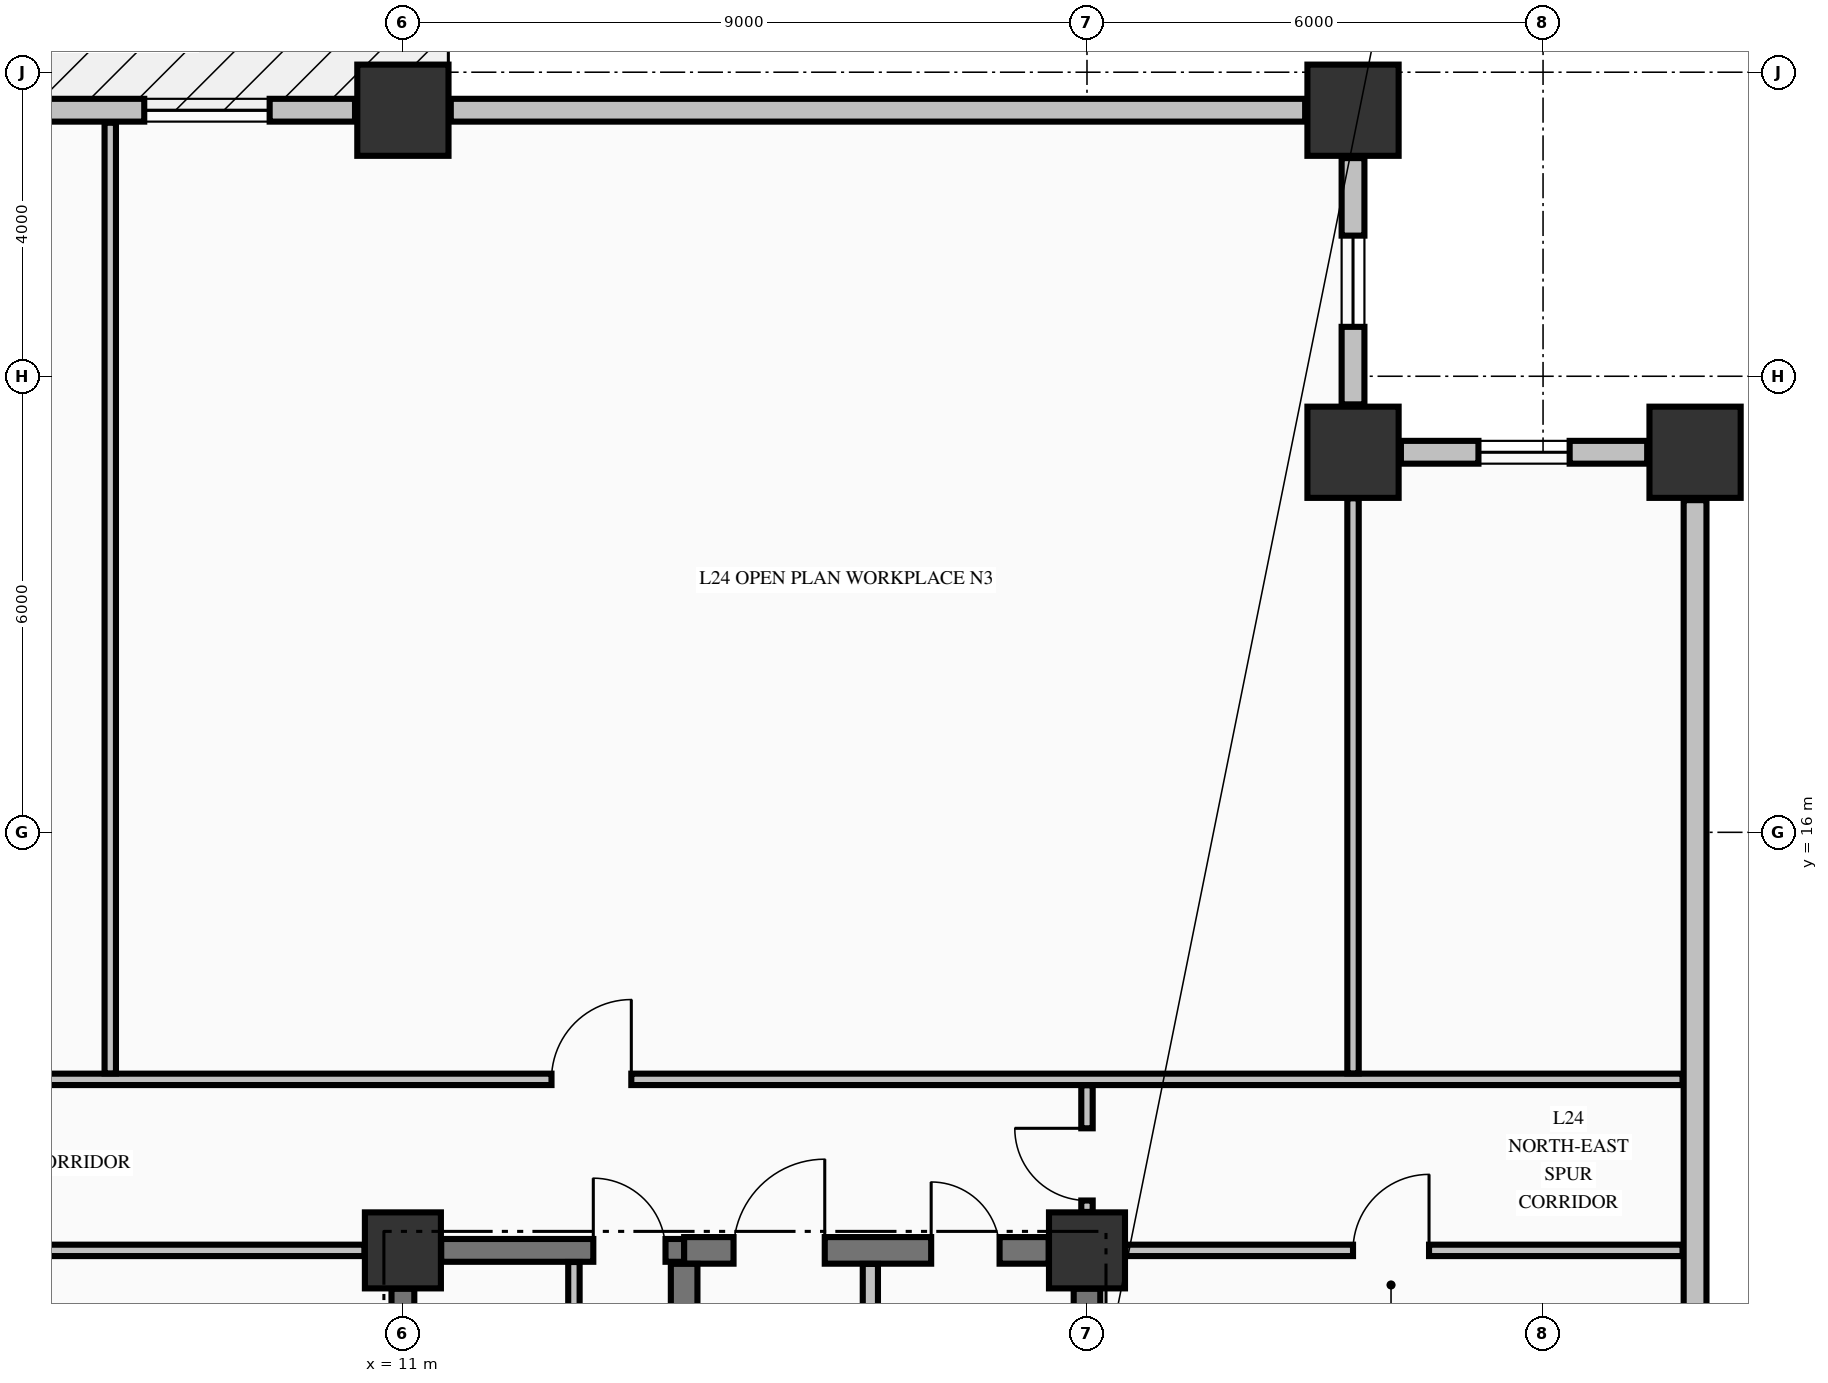
"""IFC4 building model, lengths in metres.
Left out: names, types, materials, properties, quantities, classifications, styles, units other than length and angle.
Written with IfcOpenShell. Run it as: python <this file> out.ifc"""

import sys

from ifc_helpers import new_model, si_unit, direction, frame, frame_2d, origin, origin_2d, place, context, subcontext, project, spatial, rectangle, extrude, element, fill, save


model = new_model("IFC4")
c1 = context("Model", 3, precision=1e-05, world=origin(), true_north=direction((0.0, 1.0)))
c2 = subcontext(c1, "Body", "Model", "MODEL_VIEW")
j1 = project(units=[si_unit("LENGTHUNIT", "METRE"), si_unit("PLANEANGLEUNIT", "RADIAN")], contexts=[c1])
p1 = place(None, origin())
s1 = spatial("IfcSite", under=j1, at=p1, CompositionType="ELEMENT")
p2 = place(p1, origin())
s2 = spatial("IfcBuilding", under=s1, at=p2, CompositionType="ELEMENT")
p3 = place(p2, frame((0.0, 0.0, 98.5)))
s3 = spatial("IfcBuildingStorey", under=s2, at=p3, CompositionType="ELEMENT", Elevation=98.5)
for number, where, z_axis, x_axis in (
    (1, (11.0, 25.5, -0.275), (0.0, 0.0, 1.0), (1.0, 0.0, 0.0)),
    (2, (23.5, 25.5, -0.275), (0.0, 0.0, 1.0), (1.0, 0.0, 0.0)),
    (3, (28.0, 21.0, -0.275), (0.0, 0.0, 1.0), (1.0, 0.0, 0.0)),
    (4, (23.5, 21.0, -0.275), (0.0, 0.0, 1.0), (1.0, 0.0, 0.0)),
):
    element("IfcColumn", number, at=place(p3, frame(where, z_axis=z_axis, x_axis=x_axis)), inside=s3, PredefinedType="COLUMN", context=c2, shape_type="SweptSolid", body=[
        extrude(rectangle(XDim=1.2, YDim=1.2, at=origin_2d()), origin(), (0.0, 0.0, 1.0), 3.595),
    ])
for number, where, z_axis, x_axis in (
    (5, (11.0, 10.5, -0.275), (0.0, 0.0, 1.0), (1.0, 0.0, 0.0)),
    (6, (20.0, 10.5, -0.275), (0.0, 0.0, 1.0), (1.0, 0.0, 0.0)),
):
    element("IfcColumn", number, at=place(p3, frame(where, z_axis=z_axis, x_axis=x_axis)), inside=s3, PredefinedType="COLUMN", context=c2, shape_type="SweptSolid", body=[
        extrude(rectangle(XDim=1.0, YDim=1.0, at=origin_2d()), origin(), (0.0, 0.0, 1.0), 3.595),
    ])
p4 = place(p3, frame((27.37, 21.0, 0.0), z_axis=(0.0, 0.0, 1.0), x_axis=(-1.0, 0.0, 0.0)))
e7 = element("IfcWall", 7, at=p4, inside=s3, PredefinedType="STANDARD", context=c2, shape_type="SweptSolid", body=[
    extrude(rectangle(XDim=3.24, YDim=0.3, at=frame_2d((1.62, 0.0))), origin(), (0.0, 0.0, 1.0), 2.712),
])
p5 = place(p4, frame((1.02, 0.0, 0.82)))
e8 = element("IfcOpeningElement", 8, at=p5, cuts=e7, PredefinedType="OPENING", context=c2, shape_type="SweptSolid", body=[
    extrude(rectangle(XDim=1.2, YDim=1.65, at=frame_2d((0.6, 0.825))), frame((0.0, 0.16, 0.0), z_axis=(0.0, -1.0, 0.0), x_axis=(1.0, 0.0, 0.0)), (0.0, 0.0, 1.0), 0.32),
])
p6 = place(p3, frame((23.5, 21.63, 0.0), z_axis=(0.0, 0.0, 1.0), x_axis=(0.0, 1.0, 0.0)))
e9 = element("IfcWall", 9, at=p6, inside=s3, PredefinedType="STANDARD", context=c2, shape_type="SweptSolid", body=[
    extrude(rectangle(XDim=3.24, YDim=0.3, at=frame_2d((1.62, 0.0))), origin(), (0.0, 0.0, 1.0), 2.712),
])
p7 = place(p6, frame((1.02, 0.0, 0.82)))
e10 = element("IfcOpeningElement", 10, at=p7, cuts=e9, PredefinedType="OPENING", context=c2, shape_type="SweptSolid", body=[
    extrude(rectangle(XDim=1.2, YDim=1.65, at=frame_2d((0.6, 0.825))), frame((0.0, 0.16, 0.0), z_axis=(0.0, -1.0, 0.0), x_axis=(1.0, 0.0, 0.0)), (0.0, 0.0, 1.0), 0.32),
])
p8 = place(p3, frame((10.37, 25.5, 0.0), z_axis=(0.0, 0.0, 1.0), x_axis=(-1.0, 0.0, 0.0)))
e11 = element("IfcWall", 11, at=p8, inside=s3, PredefinedType="STANDARD", context=c2, shape_type="SweptSolid", body=[
    extrude(rectangle(XDim=9.74, YDim=0.3, at=frame_2d((4.87, 0.0))), origin(), (0.0, 0.0, 1.0), 2.712),
])
p9 = place(p8, frame((1.123, 0.0, 0.8)))
e12 = element("IfcOpeningElement", 12, at=p9, cuts=e11, PredefinedType="OPENING", context=c2, shape_type="SweptSolid", body=[
    extrude(rectangle(XDim=1.65, YDim=1.7, at=frame_2d((0.825, 0.85))), frame((0.0, 0.16, 0.0), z_axis=(0.0, -1.0, 0.0), x_axis=(1.0, 0.0, 0.0)), (0.0, 0.0, 1.0), 0.32),
])
p10 = place(p8, frame((5.019, 0.0, 0.8)))
e13 = element("IfcOpeningElement", 13, at=p10, cuts=e11, PredefinedType="OPENING", context=c2, shape_type="SweptSolid", body=[
    extrude(rectangle(XDim=1.65, YDim=1.7, at=frame_2d((0.825, 0.85))), frame((0.0, 0.16, 0.0), z_axis=(0.0, -1.0, 0.0), x_axis=(1.0, 0.0, 0.0)), (0.0, 0.0, 1.0), 0.32),
])
p11 = place(p8, frame((6.967, 0.0, 0.8)))
e14 = element("IfcOpeningElement", 14, at=p11, cuts=e11, PredefinedType="OPENING", context=c2, shape_type="SweptSolid", body=[
    extrude(rectangle(XDim=1.65, YDim=1.7, at=frame_2d((0.825, 0.85))), frame((0.0, 0.16, 0.0), z_axis=(0.0, -1.0, 0.0), x_axis=(1.0, 0.0, 0.0)), (0.0, 0.0, 1.0), 0.32),
])
p12 = place(p3, frame((22.87, 25.5, 0.0), z_axis=(0.0, 0.0, 1.0), x_axis=(-1.0, 0.0, 0.0)))
e15 = element("IfcWall", 15, at=p12, inside=s3, PredefinedType="STANDARD", context=c2, shape_type="SweptSolid", body=[
    extrude(rectangle(XDim=11.24, YDim=0.3, at=frame_2d((5.62, 0.0))), origin(), (0.0, 0.0, 1.0), 2.712),
])
p13 = place(p3, frame((28.0, 9.63, 0.0), z_axis=(0.0, 0.0, 1.0), x_axis=(0.0, 1.0, 0.0)))
e16 = element("IfcWall", 16, at=p13, inside=s3, PredefinedType="STANDARD", context=c2, shape_type="SweptSolid", body=[
    extrude(rectangle(XDim=10.74, YDim=0.3, at=frame_2d((5.37, 0.0))), origin(), (0.0, 0.0, 1.0), 2.712),
])
p14 = place(p3, frame((11.504, 10.5, 0.0), z_axis=(0.0, 0.0, 1.0), x_axis=(1.0, 0.0, 0.0)))
e17 = element("IfcWall", 17, at=p14, inside=s3, PredefinedType="SHEAR", context=c2, shape_type="SweptSolid", body=[
    extrude(rectangle(XDim=3.196, YDim=0.3, at=frame_2d((1.598, 0.0))), origin(), (0.0, 0.0, 1.0), 3.32),
])
p15 = place(p14, frame((2.001, 0.0, 0.0)))
e18 = element("IfcOpeningElement", 18, at=p15, cuts=e17, PredefinedType="OPENING", context=c2, shape_type="SweptSolid", body=[
    extrude(rectangle(XDim=0.95, YDim=2.15, at=frame_2d((0.475, 1.075))), frame((0.0, 0.16, 0.0), z_axis=(0.0, -1.0, 0.0), x_axis=(1.0, 0.0, 0.0)), (0.0, 0.0, 1.0), 0.32),
])
p16 = place(p3, frame((14.7, 10.5, 0.0), z_axis=(0.0, 0.0, 1.0), x_axis=(1.0, 0.0, 0.0)))
e19 = element("IfcWall", 19, at=p16, inside=s3, PredefinedType="SHEAR", context=c2, shape_type="SweptSolid", body=[
    extrude(rectangle(XDim=4.796, YDim=0.35, at=frame_2d((2.398, 0.0))), origin(), (0.0, 0.0, 1.0), 3.32),
])
p17 = place(p16, frame((0.65, 0.0, 0.0)))
e20 = element("IfcOpeningElement", 20, at=p17, cuts=e19, PredefinedType="OPENING", context=c2, shape_type="SweptSolid", body=[
    extrude(rectangle(XDim=1.2, YDim=2.15, at=frame_2d((0.6, 1.075))), frame((0.0, 0.185, 0.0), z_axis=(0.0, -1.0, 0.0), x_axis=(1.0, 0.0, 0.0)), (0.0, 0.0, 1.0), 0.37),
])
p18 = place(p16, frame((3.25, 0.0, 0.0)))
e21 = element("IfcOpeningElement", 21, at=p18, cuts=e19, PredefinedType="OPENING", context=c2, shape_type="SweptSolid", body=[
    extrude(rectangle(XDim=0.9, YDim=2.15, at=frame_2d((0.45, 1.075))), frame((0.0, 0.185, 0.0), z_axis=(0.0, -1.0, 0.0), x_axis=(1.0, 0.0, 0.0)), (0.0, 0.0, 1.0), 0.37),
])
p19 = place(p3, frame((-10.494, 10.5, 0.0), z_axis=(0.0, 0.0, 1.0), x_axis=(1.0, 0.0, 0.0)))
e22 = element("IfcWall", 22, at=p19, inside=s3, PredefinedType="PARTITIONING", context=c2, shape_type="SweptSolid", body=[
    extrude(rectangle(XDim=20.988, YDim=0.15, at=frame_2d((10.494, 0.0))), origin(), (0.0, 0.0, 1.0), 3.32),
])
p20 = place(p19, frame((8.194, 0.0, 0.0)))
e23 = element("IfcOpeningElement", 23, at=p20, cuts=e22, PredefinedType="OPENING", context=c2, shape_type="SweptSolid", body=[
    extrude(rectangle(XDim=1.1, YDim=2.15, at=frame_2d((0.55, 1.075))), frame((0.0, 0.085, 0.0), z_axis=(0.0, -1.0, 0.0), x_axis=(1.0, 0.0, 0.0)), (0.0, 0.0, 1.0), 0.17),
])
p21 = place(p3, frame((20.506, 10.5, 0.0), z_axis=(0.0, 0.0, 1.0), x_axis=(1.0, 0.0, 0.0)))
e24 = element("IfcWall", 24, at=p21, inside=s3, PredefinedType="PARTITIONING", context=c2, shape_type="SweptSolid", body=[
    extrude(rectangle(XDim=7.329, YDim=0.15, at=frame_2d((3.665, 0.0))), origin(), (0.0, 0.0, 1.0), 3.32),
])
p22 = place(p21, frame((2.994, 0.0, 0.0)))
e25 = element("IfcOpeningElement", 25, at=p22, cuts=e24, PredefinedType="OPENING", context=c2, shape_type="SweptSolid", body=[
    extrude(rectangle(XDim=1.0, YDim=2.15, at=frame_2d((0.5, 1.075))), frame((0.0, 0.085, 0.0), z_axis=(0.0, -1.0, 0.0), x_axis=(1.0, 0.0, 0.0)), (0.0, 0.0, 1.0), 0.17),
])
p23 = place(p3, frame((-22.835, 12.75, 0.0), z_axis=(0.0, 0.0, 1.0), x_axis=(1.0, 0.0, 0.0)))
e26 = element("IfcWall", 26, at=p23, inside=s3, PredefinedType="PARTITIONING", context=c2, shape_type="SweptSolid", body=[
    extrude(rectangle(XDim=50.67, YDim=0.15, at=frame_2d((25.335, 0.0))), origin(), (0.0, 0.0, 1.0), 3.32),
])
p24 = place(p23, frame((14.61, 0.0, 0.0)))
e27 = element("IfcOpeningElement", 27, at=p24, cuts=e26, PredefinedType="OPENING", context=c2, shape_type="SweptSolid", body=[
    extrude(rectangle(XDim=1.05, YDim=2.15, at=frame_2d((0.525, 1.075))), frame((0.0, 0.085, 0.0), z_axis=(0.0, -1.0, 0.0), x_axis=(1.0, 0.0, 0.0)), (0.0, 0.0, 1.0), 0.17),
])
p25 = place(p23, frame((17.91, 0.0, 0.0)))
e28 = element("IfcOpeningElement", 28, at=p25, cuts=e26, PredefinedType="OPENING", context=c2, shape_type="SweptSolid", body=[
    extrude(rectangle(XDim=1.05, YDim=2.15, at=frame_2d((0.525, 1.075))), frame((0.0, 0.085, 0.0), z_axis=(0.0, -1.0, 0.0), x_axis=(1.0, 0.0, 0.0)), (0.0, 0.0, 1.0), 0.17),
])
p26 = place(p23, frame((35.79, 0.0, 0.0)))
e29 = element("IfcOpeningElement", 29, at=p26, cuts=e26, PredefinedType="OPENING", context=c2, shape_type="SweptSolid", body=[
    extrude(rectangle(XDim=1.05, YDim=2.15, at=frame_2d((0.525, 1.075))), frame((0.0, 0.085, 0.0), z_axis=(0.0, -1.0, 0.0), x_axis=(1.0, 0.0, 0.0)), (0.0, 0.0, 1.0), 0.17),
])
p27 = place(p3, frame((11.0, 5.852, 0.0), z_axis=(0.0, 0.0, 1.0), x_axis=(0.0, 1.0, 0.0)))
e30 = element("IfcWall", 30, at=p27, inside=s3, PredefinedType="SHEAR", context=c2, shape_type="SweptSolid", body=[
    extrude(rectangle(XDim=4.144, YDim=0.3, at=frame_2d((2.072, 0.0))), origin(), (0.0, 0.0, 1.0), 3.32),
])
p28 = place(p3, frame((14.7, 5.852, 0.0), z_axis=(0.0, 0.0, 1.0), x_axis=(0.0, 1.0, 0.0)))
e31 = element("IfcWall", 31, at=p28, inside=s3, PredefinedType="SHEAR", context=c2, shape_type="SweptSolid", body=[
    extrude(rectangle(XDim=4.471, YDim=0.35, at=frame_2d((2.235, 0.0))), origin(), (0.0, 0.0, 1.0), 3.32),
])
p29 = place(p3, frame((20.0, 5.377, 0.0), z_axis=(0.0, 0.0, 1.0), x_axis=(0.0, 1.0, 0.0)))
e32 = element("IfcWall", 32, at=p29, inside=s3, PredefinedType="SHEAR", context=c2, shape_type="SweptSolid", body=[
    extrude(rectangle(XDim=4.619, YDim=0.35, at=frame_2d((2.31, 0.0))), origin(), (0.0, 0.0, 1.0), 3.32),
])
p30 = place(p3, frame((7.15, 12.828, 0.0), z_axis=(0.0, 0.0, 1.0), x_axis=(0.0, 1.0, 0.0)))
e33 = element("IfcWall", 33, at=p30, inside=s3, PredefinedType="PARTITIONING", context=c2, shape_type="SweptSolid", body=[
    extrude(rectangle(XDim=12.507, YDim=0.15, at=frame_2d((6.253, 0.0))), origin(), (0.0, 0.0, 1.0), 3.32),
])
p31 = place(p3, frame((13.25, 5.853, 0.0), z_axis=(0.0, 0.0, 1.0), x_axis=(0.0, 1.0, 0.0)))
e34 = element("IfcWall", 34, at=p31, inside=s3, PredefinedType="PARTITIONING", context=c2, shape_type="SweptSolid", body=[
    extrude(rectangle(XDim=4.494, YDim=0.15, at=frame_2d((2.247, 0.0))), origin(), (0.0, 0.0, 1.0), 3.32),
])
p32 = place(p31, frame((1.472, 0.0, 0.0)))
e35 = element("IfcOpeningElement", 35, at=p32, cuts=e34, PredefinedType="OPENING", context=c2, shape_type="SweptSolid", body=[
    extrude(rectangle(XDim=0.95, YDim=2.15, at=frame_2d((0.475, 1.075))), frame((0.0, 0.085, 0.0), z_axis=(0.0, -1.0, 0.0), x_axis=(1.0, 0.0, 0.0)), (0.0, 0.0, 1.0), 0.17),
])
p33 = place(p3, frame((17.15, 5.378, 0.0), z_axis=(0.0, 0.0, 1.0), x_axis=(0.0, 1.0, 0.0)))
e36 = element("IfcWall", 36, at=p33, inside=s3, PredefinedType="PARTITIONING", context=c2, shape_type="SweptSolid", body=[
    extrude(rectangle(XDim=4.944, YDim=0.2, at=frame_2d((2.472, 0.0))), origin(), (0.0, 0.0, 1.0), 3.32),
])
p34 = place(p3, frame((20.0, 11.006, 0.0), z_axis=(0.0, 0.0, 1.0), x_axis=(0.0, 1.0, 0.0)))
e37 = element("IfcWall", 37, at=p34, inside=s3, PredefinedType="PARTITIONING", context=c2, shape_type="SweptSolid", body=[
    extrude(rectangle(XDim=1.666, YDim=0.15, at=frame_2d((0.833, 0.0))), origin(), (0.0, 0.0, 1.0), 2.81),
])
p35 = place(p34, frame((0.15, 0.0, 0.0)))
e38 = element("IfcOpeningElement", 38, at=p35, cuts=e37, PredefinedType="OPENING", context=c2, shape_type="SweptSolid", body=[
    extrude(rectangle(XDim=0.95, YDim=2.15, at=frame_2d((0.475, 1.075))), frame((0.0, 0.085, 0.0), z_axis=(0.0, -1.0, 0.0), x_axis=(1.0, 0.0, 0.0)), (0.0, 0.0, 1.0), 0.17),
])
p36 = place(p3, frame((23.5, 12.828, 0.0), z_axis=(0.0, 0.0, 1.0), x_axis=(0.0, 1.0, 0.0)))
e39 = element("IfcWall", 39, at=p36, inside=s3, PredefinedType="PARTITIONING", context=c2, shape_type="SweptSolid", body=[
    extrude(rectangle(XDim=7.566, YDim=0.15, at=frame_2d((3.783, 0.0))), origin(), (0.0, 0.0, 1.0), 3.32),
])
p37 = place(p5, origin())
e40 = element("IfcWindow", 40, at=p37, inside=s3, PartitioningType="SINGLE_PANEL", PredefinedType="WINDOW", context=c2, shape_type="SweptSolid", body=[
    extrude(rectangle(XDim=1.2, YDim=1.65, at=frame_2d((0.6, 0.825))), frame((0.0, 0.03, 0.0), z_axis=(0.0, -1.0, 0.0), x_axis=(1.0, 0.0, 0.0)), (0.0, 0.0, 1.0), 0.06),
])
fill(e8, e40)
p38 = place(p7, origin())
e41 = element("IfcWindow", 41, at=p38, inside=s3, PartitioningType="SINGLE_PANEL", PredefinedType="WINDOW", context=c2, shape_type="SweptSolid", body=[
    extrude(rectangle(XDim=1.2, YDim=1.65, at=frame_2d((0.6, 0.825))), frame((0.0, 0.03, 0.0), z_axis=(0.0, -1.0, 0.0), x_axis=(1.0, 0.0, 0.0)), (0.0, 0.0, 1.0), 0.06),
])
fill(e10, e41)
p39 = place(p9, origin())
e42 = element("IfcWindow", 42, at=p39, inside=s3, PartitioningType="SINGLE_PANEL", PredefinedType="WINDOW", context=c2, shape_type="SweptSolid", body=[
    extrude(rectangle(XDim=1.65, YDim=1.7, at=frame_2d((0.825, 0.85))), frame((0.0, 0.03, 0.0), z_axis=(0.0, -1.0, 0.0), x_axis=(1.0, 0.0, 0.0)), (0.0, 0.0, 1.0), 0.06),
])
fill(e12, e42)
p40 = place(p15, origin())
e43 = element("IfcDoor", 43, at=p40, inside=s3, OperationType="SINGLE_SWING_LEFT", PredefinedType="DOOR", context=c2, shape_type="SweptSolid", body=[
    extrude(rectangle(XDim=0.95, YDim=2.15, at=frame_2d((0.475, 1.075))), frame((0.0, 0.025, 0.0), z_axis=(0.0, -1.0, 0.0), x_axis=(1.0, 0.0, 0.0)), (0.0, 0.0, 1.0), 0.05),
])
fill(e18, e43)
p41 = place(p17, origin())
e44 = element("IfcDoor", 44, at=p41, inside=s3, OperationType="SINGLE_SWING_RIGHT", PredefinedType="DOOR", context=c2, shape_type="SweptSolid", body=[
    extrude(rectangle(XDim=1.2, YDim=2.15, at=frame_2d((0.6, 1.075))), frame((0.0, 0.025, 0.0), z_axis=(0.0, -1.0, 0.0), x_axis=(1.0, 0.0, 0.0)), (0.0, 0.0, 1.0), 0.05),
])
fill(e20, e44)
p42 = place(p18, origin())
e45 = element("IfcDoor", 45, at=p42, inside=s3, OperationType="SINGLE_SWING_LEFT", PredefinedType="DOOR", context=c2, shape_type="SweptSolid", body=[
    extrude(rectangle(XDim=0.9, YDim=2.15, at=frame_2d((0.45, 1.075))), frame((0.0, 0.025, 0.0), z_axis=(0.0, -1.0, 0.0), x_axis=(1.0, 0.0, 0.0)), (0.0, 0.0, 1.0), 0.05),
])
fill(e21, e45)
p43 = place(p26, origin())
e46 = element("IfcDoor", 46, at=p43, inside=s3, OperationType="SINGLE_SWING_RIGHT", PredefinedType="DOOR", context=c2, shape_type="SweptSolid", body=[
    extrude(rectangle(XDim=1.05, YDim=2.15, at=frame_2d((0.525, 1.075))), frame((0.0, 0.025, 0.0), z_axis=(0.0, -1.0, 0.0), x_axis=(1.0, 0.0, 0.0)), (0.0, 0.0, 1.0), 0.05),
])
fill(e29, e46)
p44 = place(p35, origin())
e47 = element("IfcDoor", 47, at=p44, inside=s3, OperationType="SINGLE_SWING_RIGHT", PredefinedType="DOOR", context=c2, shape_type="SweptSolid", body=[
    extrude(rectangle(XDim=0.95, YDim=2.15, at=frame_2d((0.475, 1.075))), frame((0.0, 0.025, 0.0), z_axis=(0.0, -1.0, 0.0), x_axis=(1.0, 0.0, 0.0)), (0.0, 0.0, 1.0), 0.05),
])
fill(e38, e47)
p45 = place(p22, origin())
e48 = element("IfcDoor", 48, at=p45, inside=s3, OperationType="SINGLE_SWING_RIGHT", PredefinedType="DOOR", context=c2, shape_type="SweptSolid", body=[
    extrude(rectangle(XDim=1.0, YDim=2.15, at=frame_2d((0.5, 1.075))), frame((0.0, 0.025, 0.0), z_axis=(0.0, -1.0, 0.0), x_axis=(1.0, 0.0, 0.0)), (0.0, 0.0, 1.0), 0.05),
])
fill(e25, e48)
save(model, sys.argv[1])
